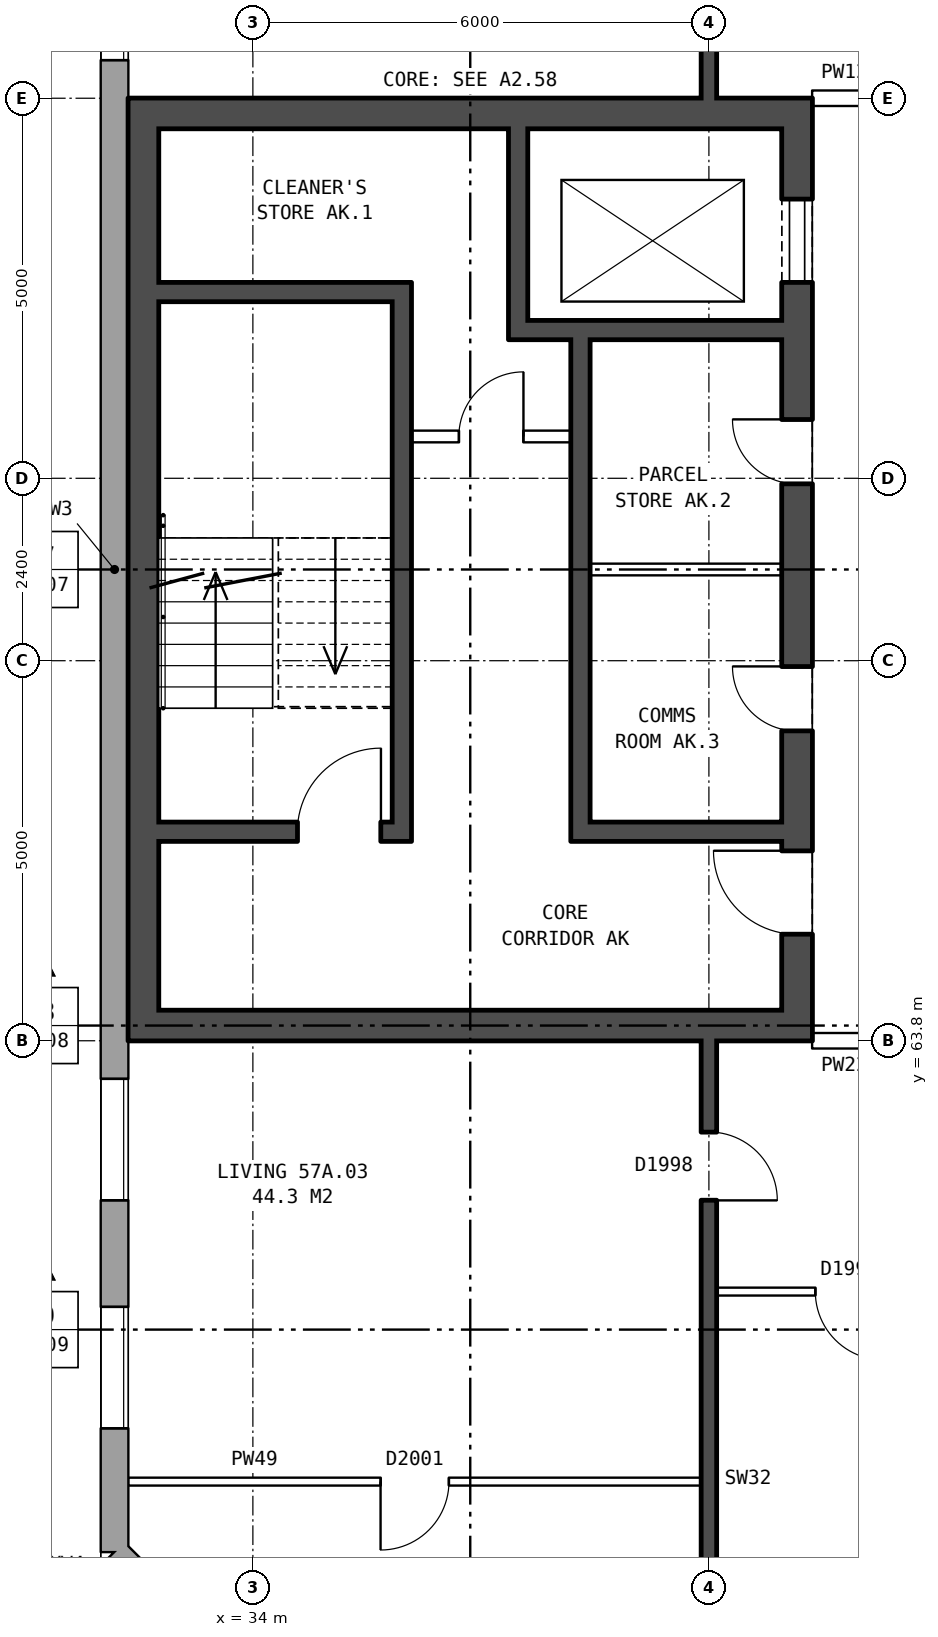
"""IFC4 building model, lengths in metres.
Left out: names, types, materials, properties, quantities, classifications, styles, units other than length and angle.
Written with IfcOpenShell. Run it as: python <this file> out.ifc"""

import sys

from ifc_helpers import new_model, si_unit, direction, frame, frame_2d, origin, place, context, subcontext, project, spatial, rectangle, extrude, element, fill, save


model = new_model("IFC4")
c1 = context("Model", 3, precision=1e-05, world=origin(), true_north=direction((0.0, 1.0)))
c2 = subcontext(c1, "Body", "Model", "MODEL_VIEW")
j1 = project(units=[si_unit("LENGTHUNIT", "METRE"), si_unit("PLANEANGLEUNIT", "RADIAN")], contexts=[c1])
p1 = place(None, origin())
s1 = spatial("IfcSite", under=j1, at=p1, CompositionType="ELEMENT")
p2 = place(p1, origin())
s2 = spatial("IfcBuilding", under=s1, at=p2, CompositionType="ELEMENT")
p3 = place(p2, frame((0.0, 0.0, 202.8)))
s3 = spatial("IfcBuildingStorey", under=s2, at=p3, CompositionType="ELEMENT", Elevation=202.8)
p4 = place(p3, frame((32.18, 57.075, 0.0), z_axis=(0.0, 0.0, 1.0), x_axis=(0.707106781187, -0.707106781187, 0.0)))
e1 = element("IfcWall", 1, at=p4, inside=s3, PredefinedType="STANDARD", context=c2, shape_type="SweptSolid", body=[
    extrude(rectangle(XDim=4.094, YDim=0.36, at=frame_2d((2.047, 0.0))), origin(), (0.0, 0.0, 1.0), 2.85),
])
p5 = place(p4, frame((1.247, 0.0, 0.8)))
e2 = element("IfcOpeningElement", 2, at=p5, cuts=e1, PredefinedType="OPENING", context=c2, shape_type="SweptSolid", body=[
    extrude(rectangle(XDim=1.6, YDim=1.8, at=frame_2d((0.8, 0.9))), frame((0.0, 0.19, 0.0), z_axis=(0.0, -1.0, 0.0), x_axis=(1.0, 0.0, 0.0)), (0.0, 0.0, 1.0), 0.38),
])
p6 = place(p3, frame((32.18, 82.925, 0.0), z_axis=(0.0, 0.0, 1.0), x_axis=(0.0, -1.0, 0.0)))
e3 = element("IfcWall", 3, at=p6, inside=s3, PredefinedType="STANDARD", context=c2, shape_type="SweptSolid", body=[
    extrude(rectangle(XDim=25.851, YDim=0.36, at=frame_2d((12.925, 0.0))), origin(), (0.0, 0.0, 1.0), 2.85),
])
p7 = place(p6, frame((1.625, 0.0, 0.8)))
e4 = element("IfcOpeningElement", 4, at=p7, cuts=e3, PredefinedType="OPENING", context=c2, shape_type="SweptSolid", body=[
    extrude(rectangle(XDim=1.6, YDim=1.8, at=frame_2d((0.8, 0.9))), frame((0.0, 0.19, 0.0), z_axis=(0.0, -1.0, 0.0), x_axis=(1.0, 0.0, 0.0)), (0.0, 0.0, 1.0), 0.38),
])
p8 = place(p6, frame((4.625, 0.0, 0.8)))
e5 = element("IfcOpeningElement", 5, at=p8, cuts=e3, PredefinedType="OPENING", context=c2, shape_type="SweptSolid", body=[
    extrude(rectangle(XDim=1.6, YDim=1.8, at=frame_2d((0.8, 0.9))), frame((0.0, 0.19, 0.0), z_axis=(0.0, -1.0, 0.0), x_axis=(1.0, 0.0, 0.0)), (0.0, 0.0, 1.0), 0.38),
])
p9 = place(p6, frame((19.625, 0.0, 0.8)))
e6 = element("IfcOpeningElement", 6, at=p9, cuts=e3, PredefinedType="OPENING", context=c2, shape_type="SweptSolid", body=[
    extrude(rectangle(XDim=1.6, YDim=1.8, at=frame_2d((0.8, 0.9))), frame((0.0, 0.19, 0.0), z_axis=(0.0, -1.0, 0.0), x_axis=(1.0, 0.0, 0.0)), (0.0, 0.0, 1.0), 0.38),
])
p10 = place(p6, frame((22.625, 0.0, 0.8)))
e7 = element("IfcOpeningElement", 7, at=p10, cuts=e3, PredefinedType="OPENING", context=c2, shape_type="SweptSolid", body=[
    extrude(rectangle(XDim=1.6, YDim=1.8, at=frame_2d((0.8, 0.9))), frame((0.0, 0.19, 0.0), z_axis=(0.0, -1.0, 0.0), x_axis=(1.0, 0.0, 0.0)), (0.0, 0.0, 1.0), 0.38),
])
p11 = place(p3, frame((41.16, 76.2, 0.0), z_axis=(0.0, 0.0, 1.0), x_axis=(0.0, -1.0, 0.0)))
e8 = element("IfcWall", 8, at=p11, inside=s3, PredefinedType="SHEAR", context=c2, shape_type="SweptSolid", body=[
    extrude(rectangle(XDim=12.4, YDim=0.4, at=frame_2d((6.2, 0.0))), origin(), (0.0, 0.0, 1.0), 2.85),
])
p12 = place(p11, frame((1.325, 0.0, 0.0)))
e9 = element("IfcOpeningElement", 9, at=p12, cuts=e8, PredefinedType="OPENING", context=c2, shape_type="SweptSolid", body=[
    extrude(rectangle(XDim=1.1, YDim=2.1, at=frame_2d((0.55, 1.05))), frame((0.0, 0.21, 0.0), z_axis=(0.0, -1.0, 0.0), x_axis=(1.0, 0.0, 0.0)), (0.0, 0.0, 1.0), 0.42),
])
p13 = place(p11, frame((4.225, 0.0, 0.0)))
e10 = element("IfcOpeningElement", 10, at=p13, cuts=e8, PredefinedType="OPENING", context=c2, shape_type="SweptSolid", body=[
    extrude(rectangle(XDim=0.85, YDim=2.1, at=frame_2d((0.425, 1.05))), frame((0.0, 0.21, 0.0), z_axis=(0.0, -1.0, 0.0), x_axis=(1.0, 0.0, 0.0)), (0.0, 0.0, 1.0), 0.42),
])
p14 = place(p11, frame((7.475, 0.0, 0.0)))
e11 = element("IfcOpeningElement", 11, at=p14, cuts=e8, PredefinedType="OPENING", context=c2, shape_type="SweptSolid", body=[
    extrude(rectangle(XDim=0.85, YDim=2.1, at=frame_2d((0.425, 1.05))), frame((0.0, 0.21, 0.0), z_axis=(0.0, -1.0, 0.0), x_axis=(1.0, 0.0, 0.0)), (0.0, 0.0, 1.0), 0.42),
])
p15 = place(p11, frame((9.9, 0.0, 0.0)))
e12 = element("IfcOpeningElement", 12, at=p15, cuts=e8, PredefinedType="OPENING", context=c2, shape_type="SweptSolid", body=[
    extrude(rectangle(XDim=1.1, YDim=2.1, at=frame_2d((0.55, 1.05))), frame((0.0, 0.21, 0.0), z_axis=(0.0, -1.0, 0.0), x_axis=(1.0, 0.0, 0.0)), (0.0, 0.0, 1.0), 0.42),
])
p16 = place(p3, frame((32.56, 76.2, 0.0), z_axis=(0.0, 0.0, 1.0), x_axis=(0.0, -1.0, 0.0)))
e13 = element("IfcWall", 13, at=p16, inside=s3, PredefinedType="SHEAR", context=c2, shape_type="SweptSolid", body=[
    extrude(rectangle(XDim=12.4, YDim=0.4, at=frame_2d((6.2, 0.0))), origin(), (0.0, 0.0, 1.0), 2.85),
])
for number, where, z_axis, x_axis in (
    (14, (40.96, 76.0, 0.0), (0.0, 0.0, 1.0), (-1.0, 0.0, 0.0)),
    (15, (40.96, 64.0, 0.0), (0.0, 0.0, 1.0), (-1.0, 0.0, 0.0)),
):
    element("IfcWall", number, at=place(p3, frame(where, z_axis=z_axis, x_axis=x_axis)), inside=s3, PredefinedType="SHEAR", context=c2, shape_type="SweptSolid", body=[
        extrude(rectangle(XDim=8.2, YDim=0.4, at=frame_2d((4.1, 0.0))), origin(), (0.0, 0.0, 1.0), 2.85),
    ])
p17 = place(p3, frame((35.835, 73.65, 0.0), z_axis=(0.0, 0.0, 1.0), x_axis=(-1.0, 0.0, 0.0)))
e16 = element("IfcWall", 16, at=p17, inside=s3, PredefinedType="SHEAR", context=c2, shape_type="SweptSolid", body=[
    extrude(rectangle(XDim=3.075, YDim=0.25, at=frame_2d((1.538, 0.0))), origin(), (0.0, 0.0, 1.0), 2.85),
])
p18 = place(p3, frame((40.96, 73.15, 0.0), z_axis=(0.0, 0.0, 1.0), x_axis=(-1.0, 0.0, 0.0)))
e17 = element("IfcWall", 17, at=p18, inside=s3, PredefinedType="SHEAR", context=c2, shape_type="SweptSolid", body=[
    extrude(rectangle(XDim=3.595, YDim=0.25, at=frame_2d((1.797, 0.0))), origin(), (0.0, 0.0, 1.0), 2.85),
])
p19 = place(p3, frame((38.185, 71.75, 0.0), z_axis=(0.0, 0.0, 1.0), x_axis=(-1.0, 0.0, 0.0)))
e18 = element("IfcWall", 18, at=p19, inside=s3, PredefinedType="PARTITIONING", context=c2, shape_type="SweptSolid", body=[
    extrude(rectangle(XDim=2.1, YDim=0.15, at=frame_2d((1.05, 0.0))), origin(), (0.0, 0.0, 1.0), 2.85),
])
p20 = place(p19, frame((0.625, 0.0, 0.0)))
e19 = element("IfcOpeningElement", 19, at=p20, cuts=e18, PredefinedType="OPENING", context=c2, shape_type="SweptSolid", body=[
    extrude(rectangle(XDim=0.85, YDim=2.1, at=frame_2d((0.425, 1.05))), frame((0.0, 0.085, 0.0), z_axis=(0.0, -1.0, 0.0), x_axis=(1.0, 0.0, 0.0)), (0.0, 0.0, 1.0), 0.17),
])
p21 = place(p3, frame((40.96, 70.0, 0.0), z_axis=(0.0, 0.0, 1.0), x_axis=(-1.0, 0.0, 0.0)))
e20 = element("IfcWall", 20, at=p21, inside=s3, PredefinedType="PARTITIONING", context=c2, shape_type="SweptSolid", body=[
    extrude(rectangle(XDim=2.525, YDim=0.15, at=frame_2d((1.262, 0.0))), origin(), (0.0, 0.0, 1.0), 2.85),
])
p22 = place(p3, frame((40.96, 66.55, 0.0), z_axis=(0.0, 0.0, 1.0), x_axis=(-1.0, 0.0, 0.0)))
e21 = element("IfcWall", 21, at=p22, inside=s3, PredefinedType="SHEAR", context=c2, shape_type="SweptSolid", body=[
    extrude(rectangle(XDim=2.525, YDim=0.25, at=frame_2d((1.262, 0.0))), origin(), (0.0, 0.0, 1.0), 2.85),
])
p23 = place(p3, frame((35.835, 66.55, 0.0), z_axis=(0.0, 0.0, 1.0), x_axis=(-1.0, 0.0, 0.0)))
e22 = element("IfcWall", 22, at=p23, inside=s3, PredefinedType="SHEAR", context=c2, shape_type="SweptSolid", body=[
    extrude(rectangle(XDim=3.075, YDim=0.25, at=frame_2d((1.538, 0.0))), origin(), (0.0, 0.0, 1.0), 2.85),
])
p24 = place(p23, frame((0.15, 0.0, 0.0)))
e23 = element("IfcOpeningElement", 23, at=p24, cuts=e22, PredefinedType="OPENING", context=c2, shape_type="SweptSolid", body=[
    extrude(rectangle(XDim=1.1, YDim=2.1, at=frame_2d((0.55, 1.05))), frame((0.0, 0.135, 0.0), z_axis=(0.0, -1.0, 0.0), x_axis=(1.0, 0.0, 0.0)), (0.0, 0.0, 1.0), 0.27),
])
p25 = place(p3, frame((38.31, 73.025, 0.0), z_axis=(0.0, 0.0, 1.0), x_axis=(0.0, -1.0, 0.0)))
e24 = element("IfcWall", 24, at=p25, inside=s3, PredefinedType="SHEAR", context=c2, shape_type="SweptSolid", body=[
    extrude(rectangle(XDim=6.6, YDim=0.25, at=frame_2d((3.3, 0.0))), origin(), (0.0, 0.0, 1.0), 2.85),
])
p26 = place(p3, frame((37.49, 75.8, 0.0), z_axis=(0.0, 0.0, 1.0), x_axis=(0.0, -1.0, 0.0)))
e25 = element("IfcWall", 25, at=p26, inside=s3, PredefinedType="SHEAR", context=c2, shape_type="SweptSolid", body=[
    extrude(rectangle(XDim=2.525, YDim=0.25, at=frame_2d((1.263, 0.0))), origin(), (0.0, 0.0, 1.0), 2.85),
])
p27 = place(p3, frame((35.96, 73.775, 0.0), z_axis=(0.0, 0.0, 1.0), x_axis=(0.0, -1.0, 0.0)))
e26 = element("IfcWall", 26, at=p27, inside=s3, PredefinedType="SHEAR", context=c2, shape_type="SweptSolid", body=[
    extrude(rectangle(XDim=7.35, YDim=0.25, at=frame_2d((3.675, 0.0))), origin(), (0.0, 0.0, 1.0), 2.85),
])
p28 = place(p3, frame((32.36, 58.0, 0.0), z_axis=(0.0, 0.0, 1.0), x_axis=(1.0, 0.0, 0.0)))
e27 = element("IfcWall", 27, at=p28, inside=s3, PredefinedType="PARTITIONING", context=c2, shape_type="SweptSolid", body=[
    extrude(rectangle(XDim=7.54, YDim=0.1, at=frame_2d((3.77, 0.0))), origin(), (0.0, 0.0, 1.0), 2.85),
])
p29 = place(p28, frame((3.32, 0.0, 0.0)))
e28 = element("IfcOpeningElement", 28, at=p29, cuts=e27, PredefinedType="OPENING", context=c2, shape_type="SweptSolid", body=[
    extrude(rectangle(XDim=0.9, YDim=2.1, at=frame_2d((0.45, 1.05))), frame((0.0, 0.06, 0.0), z_axis=(0.0, -1.0, 0.0), x_axis=(1.0, 0.0, 0.0)), (0.0, 0.0, 1.0), 0.12),
])
p30 = place(p3, frame((40.1, 60.5, 0.0), z_axis=(0.0, 0.0, 1.0), x_axis=(1.0, 0.0, 0.0)))
e29 = element("IfcWall", 29, at=p30, inside=s3, PredefinedType="PARTITIONING", context=c2, shape_type="SweptSolid", body=[
    extrude(rectangle(XDim=5.8, YDim=0.1, at=frame_2d((2.9, 0.0))), origin(), (0.0, 0.0, 1.0), 2.85),
])
p31 = place(p30, frame((1.3, 0.0, 0.0)))
e30 = element("IfcOpeningElement", 30, at=p31, cuts=e29, PredefinedType="OPENING", context=c2, shape_type="SweptSolid", body=[
    extrude(rectangle(XDim=0.9, YDim=2.1, at=frame_2d((0.45, 1.05))), frame((0.0, 0.06, 0.0), z_axis=(0.0, -1.0, 0.0), x_axis=(1.0, 0.0, 0.0)), (0.0, 0.0, 1.0), 0.12),
])
p32 = place(p30, frame((4.2, 0.0, 0.0)))
e31 = element("IfcOpeningElement", 31, at=p32, cuts=e29, PredefinedType="OPENING", context=c2, shape_type="SweptSolid", body=[
    extrude(rectangle(XDim=0.9, YDim=2.1, at=frame_2d((0.45, 1.05))), frame((0.0, 0.06, 0.0), z_axis=(0.0, -1.0, 0.0), x_axis=(1.0, 0.0, 0.0)), (0.0, 0.0, 1.0), 0.12),
])
p33 = place(p3, frame((41.36, 63.8, 0.0), z_axis=(0.0, 0.0, 1.0), x_axis=(1.0, 0.0, 0.0)))
e32 = element("IfcWall", 32, at=p33, inside=s3, PredefinedType="PARTITIONING", context=c2, shape_type="SweptSolid", body=[
    extrude(rectangle(XDim=3.0, YDim=0.2, at=frame_2d((1.5, 0.0))), origin(), (0.0, 0.0, 1.0), 2.85),
])
p34 = place(p33, frame((1.0, 0.0, 0.0)))
e33 = element("IfcOpeningElement", 33, at=p34, cuts=e32, PredefinedType="OPENING", context=c2, shape_type="SweptSolid", body=[
    extrude(rectangle(XDim=1.0, YDim=2.1, at=frame_2d((0.5, 1.05))), frame((0.0, 0.11, 0.0), z_axis=(0.0, -1.0, 0.0), x_axis=(1.0, 0.0, 0.0)), (0.0, 0.0, 1.0), 0.22),
])
p35 = place(p3, frame((41.36, 76.2, 0.0), z_axis=(0.0, 0.0, 1.0), x_axis=(1.0, 0.0, 0.0)))
e34 = element("IfcWall", 34, at=p35, inside=s3, PredefinedType="PARTITIONING", context=c2, shape_type="SweptSolid", body=[
    extrude(rectangle(XDim=3.0, YDim=0.2, at=frame_2d((1.5, 0.0))), origin(), (0.0, 0.0, 1.0), 2.85),
])
p36 = place(p35, frame((1.0, 0.0, 0.0)))
e35 = element("IfcOpeningElement", 35, at=p36, cuts=e34, PredefinedType="OPENING", context=c2, shape_type="SweptSolid", body=[
    extrude(rectangle(XDim=1.0, YDim=2.1, at=frame_2d((0.5, 1.05))), frame((0.0, 0.11, 0.0), z_axis=(0.0, -1.0, 0.0), x_axis=(1.0, 0.0, 0.0)), (0.0, 0.0, 1.0), 0.22),
])
p37 = place(p3, frame((40.0, 54.36, 0.0), z_axis=(0.0, 0.0, 1.0), x_axis=(0.0, 1.0, 0.0)))
e36 = element("IfcWall", 36, at=p37, inside=s3, PredefinedType="SOLIDWALL", context=c2, shape_type="SweptSolid", body=[
    extrude(rectangle(XDim=9.44, YDim=0.2, at=frame_2d((4.72, 0.0))), origin(), (0.0, 0.0, 1.0), 2.85),
])
p38 = place(p37, frame((7.34, 0.0, 0.0)))
e37 = element("IfcOpeningElement", 37, at=p38, cuts=e36, PredefinedType="OPENING", context=c2, shape_type="SweptSolid", body=[
    extrude(rectangle(XDim=0.9, YDim=2.1, at=frame_2d((0.45, 1.05))), frame((0.0, 0.11, 0.0), z_axis=(0.0, -1.0, 0.0), x_axis=(1.0, 0.0, 0.0)), (0.0, 0.0, 1.0), 0.22),
])
p39 = place(p3, frame((40.0, 76.2, 0.0), z_axis=(0.0, 0.0, 1.0), x_axis=(0.0, 1.0, 0.0)))
e38 = element("IfcWall", 38, at=p39, inside=s3, PredefinedType="SOLIDWALL", context=c2, shape_type="SweptSolid", body=[
    extrude(rectangle(XDim=9.44, YDim=0.2, at=frame_2d((4.72, 0.0))), origin(), (0.0, 0.0, 1.0), 2.85),
])
p40 = place(p39, frame((1.5, 0.0, 0.0)))
e39 = element("IfcOpeningElement", 39, at=p40, cuts=e38, PredefinedType="OPENING", context=c2, shape_type="SweptSolid", body=[
    extrude(rectangle(XDim=0.9, YDim=2.1, at=frame_2d((0.45, 1.05))), frame((0.0, 0.11, 0.0), z_axis=(0.0, -1.0, 0.0), x_axis=(1.0, 0.0, 0.0)), (0.0, 0.0, 1.0), 0.22),
])
p41 = place(p8, origin())
e40 = element("IfcWindow", 40, at=p41, inside=s3, PartitioningType="SINGLE_PANEL", PredefinedType="WINDOW", context=c2, shape_type="SweptSolid", body=[
    extrude(rectangle(XDim=1.6, YDim=1.8, at=frame_2d((0.8, 0.9))), frame((0.0, 0.15, 0.0), z_axis=(0.0, -1.0, 0.0), x_axis=(1.0, 0.0, 0.0)), (0.0, 0.0, 1.0), 0.06),
])
fill(e5, e40)
p42 = place(p9, origin())
e41 = element("IfcWindow", 41, at=p42, inside=s3, PartitioningType="SINGLE_PANEL", PredefinedType="WINDOW", context=c2, shape_type="SweptSolid", body=[
    extrude(rectangle(XDim=1.6, YDim=1.8, at=frame_2d((0.8, 0.9))), frame((0.0, 0.15, 0.0), z_axis=(0.0, -1.0, 0.0), x_axis=(1.0, 0.0, 0.0)), (0.0, 0.0, 1.0), 0.06),
])
fill(e6, e41)
p43 = place(p10, origin())
e42 = element("IfcWindow", 42, at=p43, inside=s3, PartitioningType="SINGLE_PANEL", PredefinedType="WINDOW", context=c2, shape_type="SweptSolid", body=[
    extrude(rectangle(XDim=1.6, YDim=1.8, at=frame_2d((0.8, 0.9))), frame((0.0, 0.15, 0.0), z_axis=(0.0, -1.0, 0.0), x_axis=(1.0, 0.0, 0.0)), (0.0, 0.0, 1.0), 0.06),
])
fill(e7, e42)
p44 = place(p12, origin())
e43 = element("IfcDoor", 43, at=p44, inside=s3, OperationType="DOUBLE_DOOR_SLIDING", PredefinedType="DOOR", context=c2, shape_type="SweptSolid", body=[
    extrude(rectangle(XDim=1.1, YDim=2.1, at=frame_2d((0.55, 1.05))), frame((0.0, -0.135, 0.0), z_axis=(0.0, -1.0, 0.0), x_axis=(1.0, 0.0, 0.0)), (0.0, 0.0, 1.0), 0.05),
])
fill(e9, e43)
p45 = place(p13, frame((0.85, 0.0, 0.0), z_axis=(0.0, 0.0, 1.0), x_axis=(-1.0, 0.0, 0.0)))
e44 = element("IfcDoor", 44, at=p45, inside=s3, OperationType="SINGLE_SWING_RIGHT", PredefinedType="DOOR", context=c2, shape_type="SweptSolid", body=[
    extrude(rectangle(XDim=0.85, YDim=2.1, at=frame_2d((0.425, 1.05))), frame((0.0, 0.185, 0.0), z_axis=(0.0, -1.0, 0.0), x_axis=(1.0, 0.0, 0.0)), (0.0, 0.0, 1.0), 0.05),
])
fill(e10, e44)
p46 = place(p14, frame((0.85, 0.0, 0.0), z_axis=(0.0, 0.0, 1.0), x_axis=(-1.0, 0.0, 0.0)))
e45 = element("IfcDoor", 45, at=p46, inside=s3, OperationType="SINGLE_SWING_RIGHT", PredefinedType="DOOR", context=c2, shape_type="SweptSolid", body=[
    extrude(rectangle(XDim=0.85, YDim=2.1, at=frame_2d((0.425, 1.05))), frame((0.0, 0.185, 0.0), z_axis=(0.0, -1.0, 0.0), x_axis=(1.0, 0.0, 0.0)), (0.0, 0.0, 1.0), 0.05),
])
fill(e11, e45)
p47 = place(p15, frame((1.1, 0.0, 0.0), z_axis=(0.0, 0.0, 1.0), x_axis=(-1.0, 0.0, 0.0)))
e46 = element("IfcDoor", 46, at=p47, inside=s3, OperationType="SINGLE_SWING_RIGHT", PredefinedType="DOOR", context=c2, shape_type="SweptSolid", body=[
    extrude(rectangle(XDim=1.1, YDim=2.1, at=frame_2d((0.55, 1.05))), frame((0.0, 0.185, 0.0), z_axis=(0.0, -1.0, 0.0), x_axis=(1.0, 0.0, 0.0)), (0.0, 0.0, 1.0), 0.05),
])
fill(e12, e46)
p48 = place(p24, frame((1.1, 0.0, 0.0), z_axis=(0.0, 0.0, 1.0), x_axis=(-1.0, 0.0, 0.0)))
e47 = element("IfcDoor", 47, at=p48, inside=s3, OperationType="SINGLE_SWING_RIGHT", PredefinedType="DOOR", context=c2, shape_type="SweptSolid", body=[
    extrude(rectangle(XDim=1.1, YDim=2.1, at=frame_2d((0.55, 1.05))), frame((0.0, 0.025, 0.0), z_axis=(0.0, -1.0, 0.0), x_axis=(1.0, 0.0, 0.0)), (0.0, 0.0, 1.0), 0.05),
])
fill(e23, e47)
p49 = place(p20, frame((0.85, 0.0, 0.0), z_axis=(0.0, 0.0, 1.0), x_axis=(-1.0, 0.0, 0.0)))
e48 = element("IfcDoor", 48, at=p49, inside=s3, OperationType="SINGLE_SWING_RIGHT", PredefinedType="DOOR", context=c2, shape_type="SweptSolid", body=[
    extrude(rectangle(XDim=0.85, YDim=2.1, at=frame_2d((0.425, 1.05))), frame((0.0, 0.025, 0.0), z_axis=(0.0, -1.0, 0.0), x_axis=(1.0, 0.0, 0.0)), (0.0, 0.0, 1.0), 0.05),
])
fill(e19, e48)
p50 = place(p31, frame((0.9, 0.0, 0.0), z_axis=(0.0, 0.0, 1.0), x_axis=(-1.0, 0.0, 0.0)))
e49 = element("IfcDoor", 49, at=p50, inside=s3, OperationType="SINGLE_SWING_LEFT", PredefinedType="DOOR", context=c2, shape_type="SweptSolid", body=[
    extrude(rectangle(XDim=0.9, YDim=2.1, at=frame_2d((0.45, 1.05))), frame((0.0, 0.025, 0.0), z_axis=(0.0, -1.0, 0.0), x_axis=(1.0, 0.0, 0.0)), (0.0, 0.0, 1.0), 0.05),
])
fill(e30, e49)
p51 = place(p29, frame((0.9, 0.0, 0.0), z_axis=(0.0, 0.0, 1.0), x_axis=(-1.0, 0.0, 0.0)))
e50 = element("IfcDoor", 50, at=p51, inside=s3, OperationType="SINGLE_SWING_RIGHT", PredefinedType="DOOR", context=c2, shape_type="SweptSolid", body=[
    extrude(rectangle(XDim=0.9, YDim=2.1, at=frame_2d((0.45, 1.05))), frame((0.0, 0.025, 0.0), z_axis=(0.0, -1.0, 0.0), x_axis=(1.0, 0.0, 0.0)), (0.0, 0.0, 1.0), 0.05),
])
fill(e28, e50)
p52 = place(p38, frame((0.9, 0.0, 0.0), z_axis=(0.0, 0.0, 1.0), x_axis=(-1.0, 0.0, 0.0)))
e51 = element("IfcDoor", 51, at=p52, inside=s3, OperationType="SINGLE_SWING_RIGHT", PredefinedType="DOOR", context=c2, shape_type="SweptSolid", body=[
    extrude(rectangle(XDim=0.9, YDim=2.1, at=frame_2d((0.45, 1.05))), frame((0.0, 0.025, 0.0), z_axis=(0.0, -1.0, 0.0), x_axis=(1.0, 0.0, 0.0)), (0.0, 0.0, 1.0), 0.05),
])
fill(e37, e51)
save(model, sys.argv[1])
